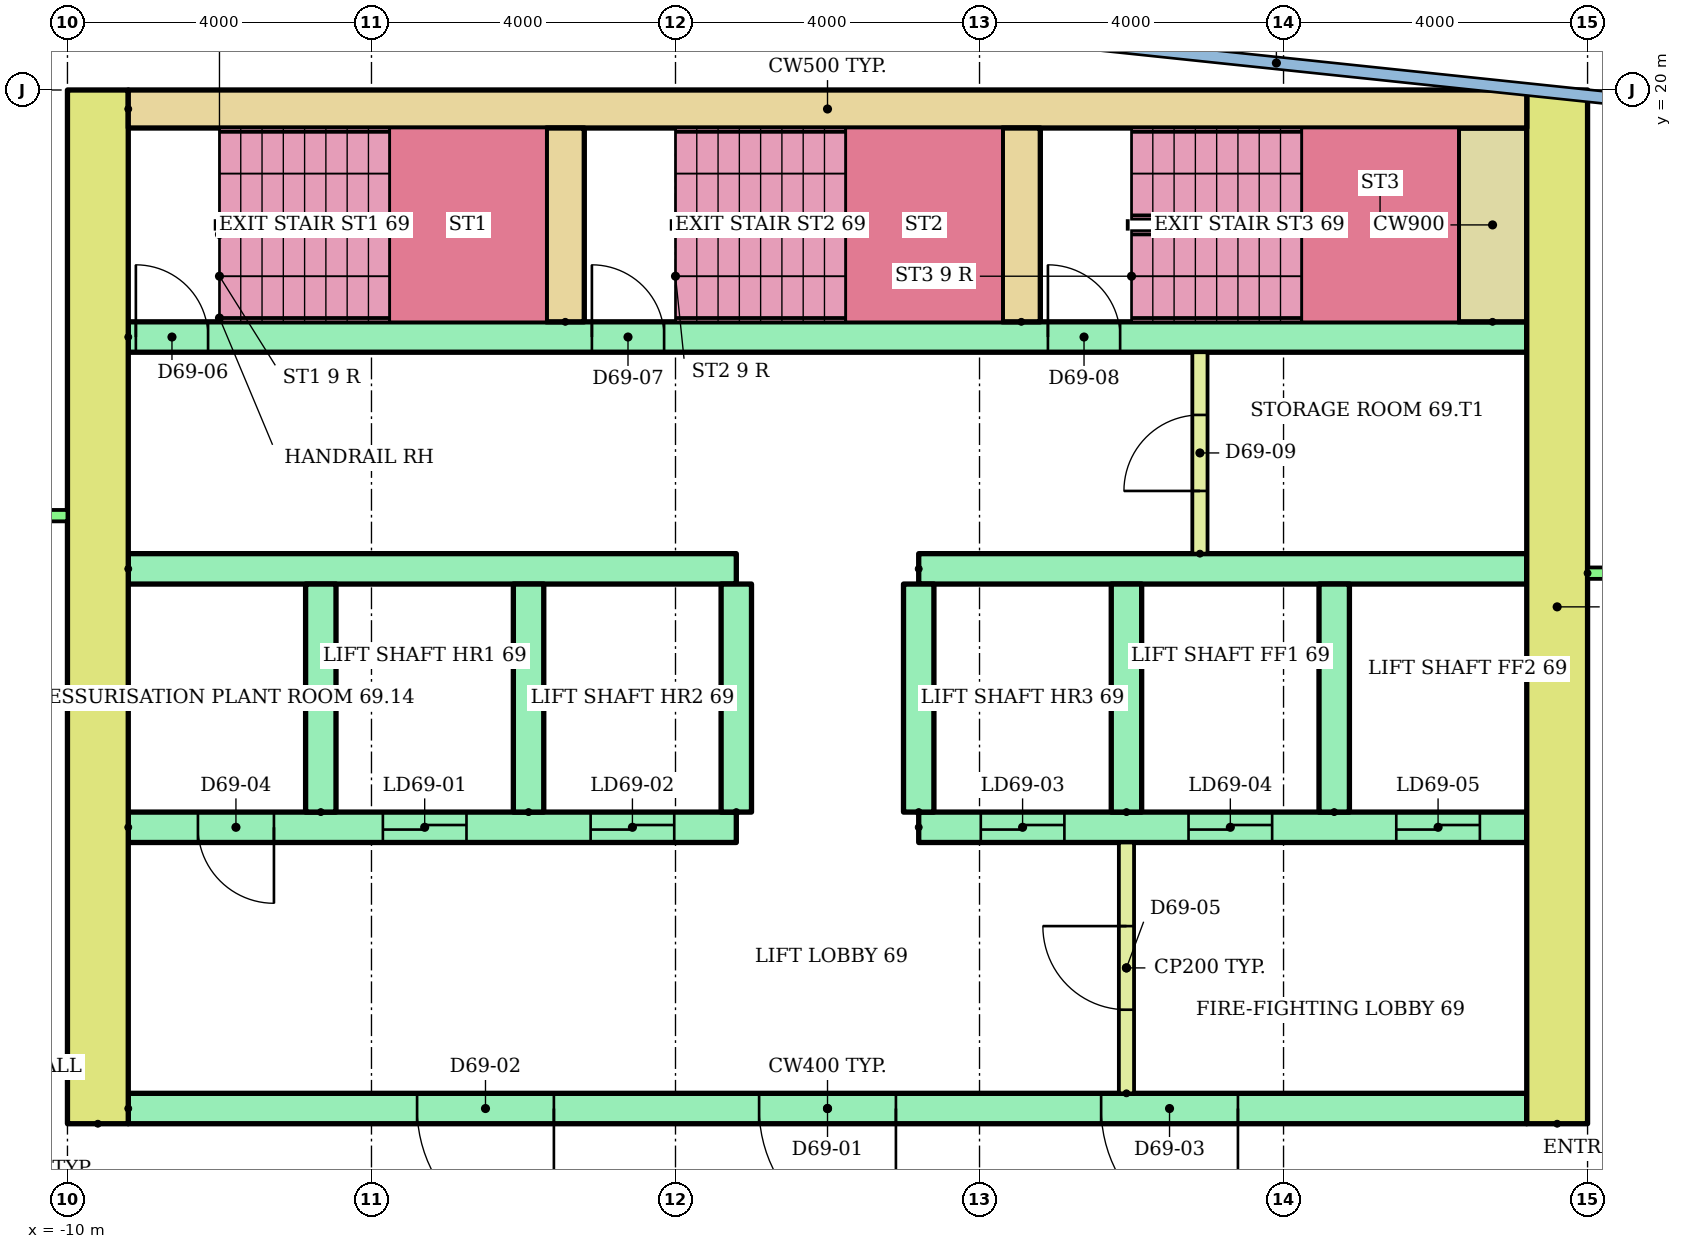
"""IFC4 building model, lengths in metres.
Left out: names, types, materials, properties, quantities, classifications, styles, units other than length and angle.
Written with IfcOpenShell. Run it as: python <this file> out.ifc"""

import sys

from ifc_helpers import new_model, si_unit, direction, frame, frame_2d, origin, place, context, subcontext, project, spatial, rectangle, extrude, element, fill, save


model = new_model("IFC4")
c1 = context("Model", 3, precision=1e-05, world=origin(), true_north=direction((0.0, 1.0)))
c2 = subcontext(c1, "Body", "Model", "MODEL_VIEW")
j1 = project(units=[si_unit("LENGTHUNIT", "METRE"), si_unit("PLANEANGLEUNIT", "RADIAN")], contexts=[c1])
p1 = place(None, origin())
s1 = spatial("IfcSite", under=j1, at=p1, CompositionType="ELEMENT")
p2 = place(p1, origin())
s2 = spatial("IfcBuilding", under=s1, at=p2, CompositionType="ELEMENT")
p3 = place(p2, frame((0.0, 0.0, 265.9)))
s3 = spatial("IfcBuildingStorey", under=s2, at=p3, CompositionType="ELEMENT", Elevation=265.9)
for number, where, z_axis, x_axis in (
    (1, (-9.6, 6.4, 0.0), (0.0, 0.0, 1.0), (0.0, 1.0, 0.0)),
    (2, (9.6, 6.4, 0.0), (0.0, 0.0, 1.0), (0.0, 1.0, 0.0)),
):
    element("IfcWall", number, at=place(p3, frame(where, z_axis=z_axis, x_axis=x_axis)), inside=s3, PredefinedType="SHEAR", context=c2, shape_type="SweptSolid", body=[
        extrude(rectangle(XDim=13.6, YDim=0.8, at=frame_2d((6.8, 0.0))), origin(), (0.0, 0.0, 1.0), 2.92),
    ])
p4 = place(p3, frame((-9.2, 19.75, 0.0)))
e3 = element("IfcWall", 3, at=p4, inside=s3, PredefinedType="SHEAR", context=c2, shape_type="SweptSolid", body=[
    extrude(rectangle(XDim=18.4, YDim=0.5, at=frame_2d((9.2, 0.0))), origin(), (0.0, 0.0, 1.0), 2.92),
])
p5 = place(p3, frame((-9.2, 6.6, 0.0)))
e4 = element("IfcWall", 4, at=p5, inside=s3, PredefinedType="SHEAR", context=c2, shape_type="SweptSolid", body=[
    extrude(rectangle(XDim=18.4, YDim=0.4, at=frame_2d((9.2, 0.0))), origin(), (0.0, 0.0, 1.0), 2.92),
])
p6 = place(p5, frame((8.3, 0.0, 0.0)))
e5 = element("IfcOpeningElement", 5, at=p6, cuts=e4, PredefinedType="OPENING", context=c2, shape_type="SweptSolid", body=[
    extrude(rectangle(XDim=1.8, YDim=2.1, at=frame_2d((0.9, 1.05))), frame((0.0, 0.21, 0.0), z_axis=(0.0, -1.0, 0.0), x_axis=(1.0, 0.0, 0.0)), (0.0, 0.0, 1.0), 0.42),
])
p7 = place(p5, frame((3.8, 0.0, 0.0)))
e6 = element("IfcOpeningElement", 6, at=p7, cuts=e4, PredefinedType="OPENING", context=c2, shape_type="SweptSolid", body=[
    extrude(rectangle(XDim=1.8, YDim=2.1, at=frame_2d((0.9, 1.05))), frame((0.0, 0.21, 0.0), z_axis=(0.0, -1.0, 0.0), x_axis=(1.0, 0.0, 0.0)), (0.0, 0.0, 1.0), 0.42),
])
p8 = place(p5, frame((12.8, 0.0, 0.0)))
e7 = element("IfcOpeningElement", 7, at=p8, cuts=e4, PredefinedType="OPENING", context=c2, shape_type="SweptSolid", body=[
    extrude(rectangle(XDim=1.8, YDim=2.1, at=frame_2d((0.9, 1.05))), frame((0.0, 0.21, 0.0), z_axis=(0.0, -1.0, 0.0), x_axis=(1.0, 0.0, 0.0)), (0.0, 0.0, 1.0), 0.42),
])
p9 = place(p3, frame((-9.2, 10.3, 0.0)))
e8 = element("IfcWall", 8, at=p9, inside=s3, PredefinedType="SHEAR", context=c2, shape_type="SweptSolid", body=[
    extrude(rectangle(XDim=8.0, YDim=0.4, at=frame_2d((4.0, 0.0))), origin(), (0.0, 0.0, 1.0), 2.92),
])
p10 = place(p9, frame((3.35, 0.0, 0.0)))
e9 = element("IfcOpeningElement", 9, at=p10, cuts=e8, PredefinedType="OPENING", context=c2, shape_type="SweptSolid", body=[
    extrude(rectangle(XDim=1.1, YDim=2.1, at=frame_2d((0.55, 1.05))), frame((0.0, 0.21, 0.0), z_axis=(0.0, -1.0, 0.0), x_axis=(1.0, 0.0, 0.0)), (0.0, 0.0, 1.0), 0.42),
])
p11 = place(p9, frame((6.083, 0.0, 0.0)))
e10 = element("IfcOpeningElement", 10, at=p11, cuts=e8, PredefinedType="OPENING", context=c2, shape_type="SweptSolid", body=[
    extrude(rectangle(XDim=1.1, YDim=2.1, at=frame_2d((0.55, 1.05))), frame((0.0, 0.21, 0.0), z_axis=(0.0, -1.0, 0.0), x_axis=(1.0, 0.0, 0.0)), (0.0, 0.0, 1.0), 0.42),
])
p12 = place(p9, frame((0.917, 0.0, 0.0)))
e11 = element("IfcOpeningElement", 11, at=p12, cuts=e8, PredefinedType="OPENING", context=c2, shape_type="SweptSolid", body=[
    extrude(rectangle(XDim=1.0, YDim=2.1, at=frame_2d((0.5, 1.05))), frame((0.0, 0.21, 0.0), z_axis=(0.0, -1.0, 0.0), x_axis=(1.0, 0.0, 0.0)), (0.0, 0.0, 1.0), 0.42),
])
p13 = place(p3, frame((-9.2, 13.7, 0.0)))
e12 = element("IfcWall", 12, at=p13, inside=s3, PredefinedType="SHEAR", context=c2, shape_type="SweptSolid", body=[
    extrude(rectangle(XDim=8.0, YDim=0.4, at=frame_2d((4.0, 0.0))), origin(), (0.0, 0.0, 1.0), 2.92),
])
p14 = place(p3, frame((1.2, 10.3, 0.0)))
e13 = element("IfcWall", 13, at=p14, inside=s3, PredefinedType="SHEAR", context=c2, shape_type="SweptSolid", body=[
    extrude(rectangle(XDim=8.0, YDim=0.4, at=frame_2d((4.0, 0.0))), origin(), (0.0, 0.0, 1.0), 2.92),
])
p15 = place(p14, frame((0.817, 0.0, 0.0)))
e14 = element("IfcOpeningElement", 14, at=p15, cuts=e13, PredefinedType="OPENING", context=c2, shape_type="SweptSolid", body=[
    extrude(rectangle(XDim=1.1, YDim=2.1, at=frame_2d((0.55, 1.05))), frame((0.0, 0.21, 0.0), z_axis=(0.0, -1.0, 0.0), x_axis=(1.0, 0.0, 0.0)), (0.0, 0.0, 1.0), 0.42),
])
p16 = place(p14, frame((3.55, 0.0, 0.0)))
e15 = element("IfcOpeningElement", 15, at=p16, cuts=e13, PredefinedType="OPENING", context=c2, shape_type="SweptSolid", body=[
    extrude(rectangle(XDim=1.1, YDim=2.1, at=frame_2d((0.55, 1.05))), frame((0.0, 0.21, 0.0), z_axis=(0.0, -1.0, 0.0), x_axis=(1.0, 0.0, 0.0)), (0.0, 0.0, 1.0), 0.42),
])
p17 = place(p14, frame((6.283, 0.0, 0.0)))
e16 = element("IfcOpeningElement", 16, at=p17, cuts=e13, PredefinedType="OPENING", context=c2, shape_type="SweptSolid", body=[
    extrude(rectangle(XDim=1.1, YDim=2.1, at=frame_2d((0.55, 1.05))), frame((0.0, 0.21, 0.0), z_axis=(0.0, -1.0, 0.0), x_axis=(1.0, 0.0, 0.0)), (0.0, 0.0, 1.0), 0.42),
])
p18 = place(p3, frame((1.2, 13.7, 0.0)))
e17 = element("IfcWall", 17, at=p18, inside=s3, PredefinedType="SHEAR", context=c2, shape_type="SweptSolid", body=[
    extrude(rectangle(XDim=8.0, YDim=0.4, at=frame_2d((4.0, 0.0))), origin(), (0.0, 0.0, 1.0), 2.92),
])
for number, where, z_axis, x_axis in (
    (18, (-6.667, 10.5, 0.0), (0.0, 0.0, 1.0), (0.0, 1.0, 0.0)),
    (19, (-3.933, 10.5, 0.0), (0.0, 0.0, 1.0), (0.0, 1.0, 0.0)),
    (20, (-1.2, 10.5, 0.0), (0.0, 0.0, 1.0), (0.0, 1.0, 0.0)),
    (21, (1.2, 10.5, 0.0), (0.0, 0.0, 1.0), (0.0, 1.0, 0.0)),
    (22, (3.933, 10.5, 0.0), (0.0, 0.0, 1.0), (0.0, 1.0, 0.0)),
    (23, (6.667, 10.5, 0.0), (0.0, 0.0, 1.0), (0.0, 1.0, 0.0)),
):
    element("IfcWall", number, at=place(p3, frame(where, z_axis=z_axis, x_axis=x_axis)), inside=s3, PredefinedType="SHEAR", context=c2, shape_type="SweptSolid", body=[
        extrude(rectangle(XDim=3.0, YDim=0.4, at=frame_2d((1.5, 0.0))), origin(), (0.0, 0.0, 1.0), 2.92),
    ])
p19 = place(p3, frame((3.933, 6.8, 0.0), z_axis=(0.0, 0.0, 1.0), x_axis=(0.0, 1.0, 0.0)))
e24 = element("IfcWall", 24, at=p19, inside=s3, PredefinedType="PARTITIONING", context=c2, shape_type="SweptSolid", body=[
    extrude(rectangle(XDim=3.3, YDim=0.2, at=frame_2d((1.65, 0.0))), origin(), (0.0, 0.0, 1.0), 2.92),
])
p20 = place(p19, frame((1.1, 0.0, 0.0)))
e25 = element("IfcOpeningElement", 25, at=p20, cuts=e24, PredefinedType="OPENING", context=c2, shape_type="SweptSolid", body=[
    extrude(rectangle(XDim=1.1, YDim=2.1, at=frame_2d((0.55, 1.05))), frame((0.0, 0.11, 0.0), z_axis=(0.0, -1.0, 0.0), x_axis=(1.0, 0.0, 0.0)), (0.0, 0.0, 1.0), 0.22),
])
p21 = place(p3, frame((-9.2, 16.75, 0.0)))
e26 = element("IfcWall", 26, at=p21, inside=s3, PredefinedType="SHEAR", context=c2, shape_type="SweptSolid", body=[
    extrude(rectangle(XDim=18.4, YDim=0.4, at=frame_2d((9.2, 0.0))), origin(), (0.0, 0.0, 1.0), 2.92),
])
p22 = place(p21, frame((0.1, 0.0, 0.0)))
e27 = element("IfcOpeningElement", 27, at=p22, cuts=e26, PredefinedType="OPENING", context=c2, shape_type="SweptSolid", body=[
    extrude(rectangle(XDim=0.95, YDim=2.1, at=frame_2d((0.475, 1.05))), frame((0.0, 0.21, 0.0), z_axis=(0.0, -1.0, 0.0), x_axis=(1.0, 0.0, 0.0)), (0.0, 0.0, 1.0), 0.42),
])
p23 = place(p21, frame((6.1, 0.0, 0.0)))
e28 = element("IfcOpeningElement", 28, at=p23, cuts=e26, PredefinedType="OPENING", context=c2, shape_type="SweptSolid", body=[
    extrude(rectangle(XDim=0.95, YDim=2.1, at=frame_2d((0.475, 1.05))), frame((0.0, 0.21, 0.0), z_axis=(0.0, -1.0, 0.0), x_axis=(1.0, 0.0, 0.0)), (0.0, 0.0, 1.0), 0.42),
])
p24 = place(p21, frame((12.1, 0.0, 0.0)))
e29 = element("IfcOpeningElement", 29, at=p24, cuts=e26, PredefinedType="OPENING", context=c2, shape_type="SweptSolid", body=[
    extrude(rectangle(XDim=0.95, YDim=2.1, at=frame_2d((0.475, 1.05))), frame((0.0, 0.21, 0.0), z_axis=(0.0, -1.0, 0.0), x_axis=(1.0, 0.0, 0.0)), (0.0, 0.0, 1.0), 0.42),
])
for number, where, z_axis, x_axis in (
    (30, (-3.45, 16.95, 0.0), (0.0, 0.0, 1.0), (0.0, 1.0, 0.0)),
    (31, (2.55, 16.95, 0.0), (0.0, 0.0, 1.0), (0.0, 1.0, 0.0)),
):
    element("IfcWall", number, at=place(p3, frame(where, z_axis=z_axis, x_axis=x_axis)), inside=s3, PredefinedType="SHEAR", context=c2, shape_type="SweptSolid", body=[
        extrude(rectangle(XDim=2.55, YDim=0.5, at=frame_2d((1.275, 0.0))), origin(), (0.0, 0.0, 1.0), 2.92),
    ])
p25 = place(p3, frame((8.75, 16.95, 0.0), z_axis=(0.0, 0.0, 1.0), x_axis=(0.0, 1.0, 0.0)))
e32 = element("IfcWall", 32, at=p25, inside=s3, PredefinedType="SHEAR", context=c2, shape_type="SweptSolid", body=[
    extrude(rectangle(XDim=2.55, YDim=0.9, at=frame_2d((1.275, 0.0))), origin(), (0.0, 0.0, 1.0), 2.92),
])
p26 = place(p3, frame((4.9, 13.9, 0.0), z_axis=(0.0, 0.0, 1.0), x_axis=(0.0, 1.0, 0.0)))
e33 = element("IfcWall", 33, at=p26, inside=s3, PredefinedType="PARTITIONING", context=c2, shape_type="SweptSolid", body=[
    extrude(rectangle(XDim=2.65, YDim=0.2, at=frame_2d((1.325, 0.0))), origin(), (0.0, 0.0, 1.0), 2.92),
])
p27 = place(p26, frame((0.825, 0.0, 0.0)))
e34 = element("IfcOpeningElement", 34, at=p27, cuts=e33, PredefinedType="OPENING", context=c2, shape_type="SweptSolid", body=[
    extrude(rectangle(XDim=1.0, YDim=2.1, at=frame_2d((0.5, 1.05))), frame((0.0, 0.11, 0.0), z_axis=(0.0, -1.0, 0.0), x_axis=(1.0, 0.0, 0.0)), (0.0, 0.0, 1.0), 0.22),
])
p28 = place(p3, frame((-21.89, 14.4, 0.0)))
e35 = element("IfcWall", 35, at=p28, inside=s3, PredefinedType="PARTITIONING", context=c2, shape_type="SweptSolid", body=[
    extrude(rectangle(XDim=11.89, YDim=0.15, at=frame_2d((5.945, 0.0))), origin(), (0.0, 0.0, 1.0), 2.4),
])
p29 = place(p28, frame((1.26, 0.0, 0.0)))
e36 = element("IfcOpeningElement", 36, at=p29, cuts=e35, PredefinedType="OPENING", context=c2, shape_type="SweptSolid", body=[
    extrude(rectangle(XDim=1.0, YDim=2.1, at=frame_2d((0.5, 1.05))), frame((0.0, 0.085, 0.0), z_axis=(0.0, -1.0, 0.0), x_axis=(1.0, 0.0, 0.0)), (0.0, 0.0, 1.0), 0.17),
])
p30 = place(p28, frame((8.304, 0.0, 0.0)))
e37 = element("IfcOpeningElement", 37, at=p30, cuts=e35, PredefinedType="OPENING", context=c2, shape_type="SweptSolid", body=[
    extrude(rectangle(XDim=0.9, YDim=2.1, at=frame_2d((0.45, 1.05))), frame((0.0, 0.085, 0.0), z_axis=(0.0, -1.0, 0.0), x_axis=(1.0, 0.0, 0.0)), (0.0, 0.0, 1.0), 0.17),
])
p31 = place(p3, frame((10.0, 13.643, 0.0)))
e38 = element("IfcWall", 38, at=p31, inside=s3, PredefinedType="PARTITIONING", context=c2, shape_type="SweptSolid", body=[
    extrude(rectangle(XDim=20.641, YDim=0.15, at=frame_2d((10.32, 0.0))), origin(), (0.0, 0.0, 1.0), 2.4),
])
p32 = place(p31, frame((3.42, 0.0, 0.0)))
e39 = element("IfcOpeningElement", 39, at=p32, cuts=e38, PredefinedType="OPENING", context=c2, shape_type="SweptSolid", body=[
    extrude(rectangle(XDim=1.0, YDim=2.1, at=frame_2d((0.5, 1.05))), frame((0.0, 0.085, 0.0), z_axis=(0.0, -1.0, 0.0), x_axis=(1.0, 0.0, 0.0)), (0.0, 0.0, 1.0), 0.17),
])
p33 = place(p31, frame((11.368, 0.0, 0.0)))
e40 = element("IfcOpeningElement", 40, at=p33, cuts=e38, PredefinedType="OPENING", context=c2, shape_type="SweptSolid", body=[
    extrude(rectangle(XDim=0.9, YDim=2.1, at=frame_2d((0.45, 1.05))), frame((0.0, 0.085, 0.0), z_axis=(0.0, -1.0, 0.0), x_axis=(1.0, 0.0, 0.0)), (0.0, 0.0, 1.0), 0.17),
])
p34 = place(p31, frame((18.477, 0.0, 0.0)))
e41 = element("IfcOpeningElement", 41, at=p34, cuts=e38, PredefinedType="OPENING", context=c2, shape_type="SweptSolid", body=[
    extrude(rectangle(XDim=0.9, YDim=2.1, at=frame_2d((0.45, 1.05))), frame((0.0, 0.085, 0.0), z_axis=(0.0, -1.0, 0.0), x_axis=(1.0, 0.0, 0.0)), (0.0, 0.0, 1.0), 0.17),
])
p35 = place(p6, frame((1.8, 0.0, 0.0), z_axis=(0.0, 0.0, 1.0), x_axis=(-1.0, 0.0, 0.0)))
e42 = element("IfcDoor", 42, at=p35, inside=s3, OperationType="DOUBLE_DOOR_SINGLE_SWING", PredefinedType="DOOR", context=c2, shape_type="SweptSolid", body=[
    extrude(rectangle(XDim=1.8, YDim=2.1, at=frame_2d((0.9, 1.05))), frame((0.0, 0.025, 0.0), z_axis=(0.0, -1.0, 0.0), x_axis=(1.0, 0.0, 0.0)), (0.0, 0.0, 1.0), 0.05),
])
fill(e5, e42)
p36 = place(p7, frame((1.8, 0.0, 0.0), z_axis=(0.0, 0.0, 1.0), x_axis=(-1.0, 0.0, 0.0)))
e43 = element("IfcDoor", 43, at=p36, inside=s3, OperationType="DOUBLE_DOOR_SINGLE_SWING", PredefinedType="DOOR", context=c2, shape_type="SweptSolid", body=[
    extrude(rectangle(XDim=1.8, YDim=2.1, at=frame_2d((0.9, 1.05))), frame((0.0, 0.025, 0.0), z_axis=(0.0, -1.0, 0.0), x_axis=(1.0, 0.0, 0.0)), (0.0, 0.0, 1.0), 0.05),
])
fill(e6, e43)
p37 = place(p8, frame((1.8, 0.0, 0.0), z_axis=(0.0, 0.0, 1.0), x_axis=(-1.0, 0.0, 0.0)))
e44 = element("IfcDoor", 44, at=p37, inside=s3, OperationType="DOUBLE_DOOR_SINGLE_SWING", PredefinedType="DOOR", context=c2, shape_type="SweptSolid", body=[
    extrude(rectangle(XDim=1.8, YDim=2.1, at=frame_2d((0.9, 1.05))), frame((0.0, 0.025, 0.0), z_axis=(0.0, -1.0, 0.0), x_axis=(1.0, 0.0, 0.0)), (0.0, 0.0, 1.0), 0.05),
])
fill(e7, e44)
p38 = place(p10, origin())
e45 = element("IfcDoor", 45, at=p38, inside=s3, OperationType="SLIDING_TO_LEFT", PredefinedType="DOOR", context=c2, shape_type="SweptSolid", body=[
    extrude(rectangle(XDim=1.1, YDim=2.1, at=frame_2d((0.55, 1.05))), frame((0.0, 0.025, 0.0), z_axis=(0.0, -1.0, 0.0), x_axis=(1.0, 0.0, 0.0)), (0.0, 0.0, 1.0), 0.05),
])
fill(e9, e45)
p39 = place(p11, origin())
e46 = element("IfcDoor", 46, at=p39, inside=s3, OperationType="SLIDING_TO_LEFT", PredefinedType="DOOR", context=c2, shape_type="SweptSolid", body=[
    extrude(rectangle(XDim=1.1, YDim=2.1, at=frame_2d((0.55, 1.05))), frame((0.0, 0.025, 0.0), z_axis=(0.0, -1.0, 0.0), x_axis=(1.0, 0.0, 0.0)), (0.0, 0.0, 1.0), 0.05),
])
fill(e10, e46)
p40 = place(p15, origin())
e47 = element("IfcDoor", 47, at=p40, inside=s3, OperationType="SLIDING_TO_LEFT", PredefinedType="DOOR", context=c2, shape_type="SweptSolid", body=[
    extrude(rectangle(XDim=1.1, YDim=2.1, at=frame_2d((0.55, 1.05))), frame((0.0, 0.025, 0.0), z_axis=(0.0, -1.0, 0.0), x_axis=(1.0, 0.0, 0.0)), (0.0, 0.0, 1.0), 0.05),
])
fill(e14, e47)
p41 = place(p16, origin())
e48 = element("IfcDoor", 48, at=p41, inside=s3, OperationType="SLIDING_TO_LEFT", PredefinedType="DOOR", context=c2, shape_type="SweptSolid", body=[
    extrude(rectangle(XDim=1.1, YDim=2.1, at=frame_2d((0.55, 1.05))), frame((0.0, 0.025, 0.0), z_axis=(0.0, -1.0, 0.0), x_axis=(1.0, 0.0, 0.0)), (0.0, 0.0, 1.0), 0.05),
])
fill(e15, e48)
p42 = place(p17, origin())
e49 = element("IfcDoor", 49, at=p42, inside=s3, OperationType="SLIDING_TO_LEFT", PredefinedType="DOOR", context=c2, shape_type="SweptSolid", body=[
    extrude(rectangle(XDim=1.1, YDim=2.1, at=frame_2d((0.55, 1.05))), frame((0.0, 0.025, 0.0), z_axis=(0.0, -1.0, 0.0), x_axis=(1.0, 0.0, 0.0)), (0.0, 0.0, 1.0), 0.05),
])
fill(e16, e49)
p43 = place(p12, frame((1.0, 0.0, 0.0), z_axis=(0.0, 0.0, 1.0), x_axis=(-1.0, 0.0, 0.0)))
e50 = element("IfcDoor", 50, at=p43, inside=s3, OperationType="SINGLE_SWING_RIGHT", PredefinedType="DOOR", context=c2, shape_type="SweptSolid", body=[
    extrude(rectangle(XDim=1.0, YDim=2.1, at=frame_2d((0.5, 1.05))), frame((0.0, 0.025, 0.0), z_axis=(0.0, -1.0, 0.0), x_axis=(1.0, 0.0, 0.0)), (0.0, 0.0, 1.0), 0.05),
])
fill(e11, e50)
p44 = place(p20, origin())
e51 = element("IfcDoor", 51, at=p44, inside=s3, OperationType="SINGLE_SWING_RIGHT", PredefinedType="DOOR", context=c2, shape_type="SweptSolid", body=[
    extrude(rectangle(XDim=1.1, YDim=2.1, at=frame_2d((0.55, 1.05))), frame((0.0, 0.025, 0.0), z_axis=(0.0, -1.0, 0.0), x_axis=(1.0, 0.0, 0.0)), (0.0, 0.0, 1.0), 0.05),
])
fill(e25, e51)
p45 = place(p22, origin())
e52 = element("IfcDoor", 52, at=p45, inside=s3, OperationType="SINGLE_SWING_LEFT", PredefinedType="DOOR", context=c2, shape_type="SweptSolid", body=[
    extrude(rectangle(XDim=0.95, YDim=2.1, at=frame_2d((0.475, 1.05))), frame((0.0, 0.025, 0.0), z_axis=(0.0, -1.0, 0.0), x_axis=(1.0, 0.0, 0.0)), (0.0, 0.0, 1.0), 0.05),
])
fill(e27, e52)
p46 = place(p23, origin())
e53 = element("IfcDoor", 53, at=p46, inside=s3, OperationType="SINGLE_SWING_LEFT", PredefinedType="DOOR", context=c2, shape_type="SweptSolid", body=[
    extrude(rectangle(XDim=0.95, YDim=2.1, at=frame_2d((0.475, 1.05))), frame((0.0, 0.025, 0.0), z_axis=(0.0, -1.0, 0.0), x_axis=(1.0, 0.0, 0.0)), (0.0, 0.0, 1.0), 0.05),
])
fill(e28, e53)
p47 = place(p24, origin())
e54 = element("IfcDoor", 54, at=p47, inside=s3, OperationType="SINGLE_SWING_LEFT", PredefinedType="DOOR", context=c2, shape_type="SweptSolid", body=[
    extrude(rectangle(XDim=0.95, YDim=2.1, at=frame_2d((0.475, 1.05))), frame((0.0, 0.025, 0.0), z_axis=(0.0, -1.0, 0.0), x_axis=(1.0, 0.0, 0.0)), (0.0, 0.0, 1.0), 0.05),
])
fill(e29, e54)
p48 = place(p27, origin())
e55 = element("IfcDoor", 55, at=p48, inside=s3, OperationType="SINGLE_SWING_LEFT", PredefinedType="DOOR", context=c2, shape_type="SweptSolid", body=[
    extrude(rectangle(XDim=1.0, YDim=2.1, at=frame_2d((0.5, 1.05))), frame((0.0, 0.025, 0.0), z_axis=(0.0, -1.0, 0.0), x_axis=(1.0, 0.0, 0.0)), (0.0, 0.0, 1.0), 0.05),
])
fill(e34, e55)
save(model, sys.argv[1])
